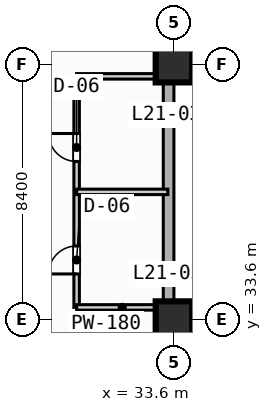
"""IFC4 building model, lengths in metres.
Left out: names, types, materials, properties, quantities, classifications, styles, units other than length and angle.
Written with IfcOpenShell. Run it as: python <this file> out.ifc"""

import sys

from ifc_helpers import new_model, si_unit, direction, frame, frame_2d, origin, origin_2d, place, context, subcontext, project, spatial, rectangle, extrude, element, fill, save


model = new_model("IFC4")
c1 = context("Model", 3, precision=1e-05, world=origin(), true_north=direction((0.0, 1.0)))
c2 = subcontext(c1, "Body", "Model", "MODEL_VIEW")
j1 = project(units=[si_unit("LENGTHUNIT", "METRE"), si_unit("PLANEANGLEUNIT", "RADIAN")], contexts=[c1])
p1 = place(None, origin())
s1 = spatial("IfcSite", under=j1, at=p1, CompositionType="ELEMENT")
p2 = place(p1, origin())
s2 = spatial("IfcBuilding", under=s1, at=p2, CompositionType="ELEMENT")
p3 = place(p2, frame((0.0, 0.0, 89.6)))
s3 = spatial("IfcBuildingStorey", under=s2, at=p3, CompositionType="ELEMENT", Elevation=89.6)
for number, where, z_axis, x_axis in (
    (1, (33.6, 33.6, 0.0), (0.0, 0.0, 1.0), (1.0, 0.0, 0.0)),
    (2, (33.6, 42.0, 0.0), (0.0, 0.0, 1.0), (1.0, 0.0, 0.0)),
):
    element("IfcColumn", number, at=place(p3, frame(where, z_axis=z_axis, x_axis=x_axis)), inside=s3, PredefinedType="COLUMN", context=c2, shape_type="SweptSolid", body=[
        extrude(rectangle(XDim=1.2, YDim=1.2, at=origin_2d()), origin(), (0.0, 0.0, 1.0), 4.4),
    ])
p4 = place(p3, frame((33.425, 89.225, 0.0), z_axis=(0.0, 0.0, 1.0), x_axis=(0.0, -1.0, 0.0)))
e3 = element("IfcWall", 3, at=p4, inside=s3, PredefinedType="STANDARD", context=c2, shape_type="SweptSolid", body=[
    extrude(rectangle(XDim=55.8, YDim=0.35, at=frame_2d((27.9, 0.0))), origin(), (0.0, 0.0, 1.0), 4.05),
])
p5 = place(p3, frame((33.425, 33.425, 0.0), z_axis=(0.0, 0.0, 1.0), x_axis=(1.0, 0.0, 0.0)))
e4 = element("IfcWall", 4, at=p5, inside=s3, PredefinedType="STANDARD", context=c2, shape_type="SweptSolid", body=[
    extrude(rectangle(XDim=39.0, YDim=0.35, at=frame_2d((19.5, 0.0))), origin(), (0.0, 0.0, 1.0), 4.05),
])
p6 = place(p5, frame((12.075, 0.0, 0.0)))
e5 = element("IfcOpeningElement", 5, at=p6, cuts=e4, PredefinedType="OPENING", context=c2, shape_type="SweptSolid", body=[
    extrude(rectangle(XDim=1.4, YDim=2.2, at=frame_2d((0.7, 1.1))), frame((0.0, 0.185, 0.0), z_axis=(0.0, -1.0, 0.0), x_axis=(1.0, 0.0, 0.0)), (0.0, 0.0, 1.0), 0.37),
])
p7 = place(p3, frame((30.4, 34.0, 0.0), z_axis=(0.0, 0.0, 1.0), x_axis=(0.0, 1.0, 0.0)))
e6 = element("IfcWall", 6, at=p7, inside=s3, PredefinedType="PLUMBINGWALL", context=c2, shape_type="SweptSolid", body=[
    extrude(rectangle(XDim=7.6, YDim=0.18, at=frame_2d((3.8, 0.0))), origin(), (0.0, 0.0, 1.0), 4.05),
])
p8 = place(p7, frame((1.1, 0.0, 0.0)))
e7 = element("IfcOpeningElement", 7, at=p8, cuts=e6, PredefinedType="OPENING", context=c2, shape_type="SweptSolid", body=[
    extrude(rectangle(XDim=0.92, YDim=2.1, at=frame_2d((0.46, 1.05))), frame((0.0, 0.1, 0.0), z_axis=(0.0, -1.0, 0.0), x_axis=(1.0, 0.0, 0.0)), (0.0, 0.0, 1.0), 0.2),
])
p9 = place(p7, frame((4.8, 0.0, 0.0)))
e8 = element("IfcOpeningElement", 8, at=p9, cuts=e6, PredefinedType="OPENING", context=c2, shape_type="SweptSolid", body=[
    extrude(rectangle(XDim=0.92, YDim=2.1, at=frame_2d((0.46, 1.05))), frame((0.0, 0.1, 0.0), z_axis=(0.0, -1.0, 0.0), x_axis=(1.0, 0.0, 0.0)), (0.0, 0.0, 1.0), 0.2),
])
for number, where, z_axis, x_axis in (
    (9, (30.4, 34.0, 0.0), (0.0, 0.0, 1.0), (1.0, 0.0, 0.0)),
    (10, (30.4, 37.8, 0.0), (0.0, 0.0, 1.0), (1.0, 0.0, 0.0)),
    (11, (30.4, 41.6, 0.0), (0.0, 0.0, 1.0), (1.0, 0.0, 0.0)),
):
    element("IfcWall", number, at=place(p3, frame(where, z_axis=z_axis, x_axis=x_axis)), inside=s3, PredefinedType="PLUMBINGWALL", context=c2, shape_type="SweptSolid", body=[
        extrude(rectangle(XDim=3.0, YDim=0.18, at=frame_2d((1.5, 0.0))), origin(), (0.0, 0.0, 1.0), 4.05),
    ])
p10 = place(p8, origin())
e12 = element("IfcDoor", 12, at=p10, inside=s3, OperationType="SINGLE_SWING_LEFT", PredefinedType="DOOR", context=c2, shape_type="SweptSolid", body=[
    extrude(rectangle(XDim=0.92, YDim=2.1, at=frame_2d((0.46, 1.05))), frame((0.0, 0.025, 0.0), z_axis=(0.0, -1.0, 0.0), x_axis=(1.0, 0.0, 0.0)), (0.0, 0.0, 1.0), 0.05),
])
fill(e7, e12)
p11 = place(p9, origin())
e13 = element("IfcDoor", 13, at=p11, inside=s3, OperationType="SINGLE_SWING_RIGHT", PredefinedType="DOOR", context=c2, shape_type="SweptSolid", body=[
    extrude(rectangle(XDim=0.92, YDim=2.1, at=frame_2d((0.46, 1.05))), frame((0.0, 0.025, 0.0), z_axis=(0.0, -1.0, 0.0), x_axis=(1.0, 0.0, 0.0)), (0.0, 0.0, 1.0), 0.05),
])
fill(e8, e13)
save(model, sys.argv[1])
